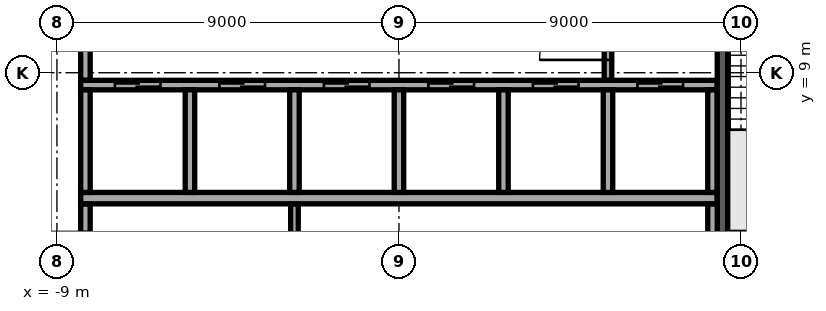
"""IFC4 building model, lengths in metres.
Left out: names, types, materials, properties, quantities, classifications, styles, units other than length and angle.
Written with IfcOpenShell. Run it as: python <this file> out.ifc"""

import sys

from ifc_helpers import new_model, si_unit, direction, frame, frame_2d, origin, place, context, subcontext, project, spatial, rectangle, extrude, element, fill, save


model = new_model("IFC4")
c1 = context("Model", 3, precision=1e-05, world=origin(), true_north=direction((0.0, 1.0)))
c2 = subcontext(c1, "Body", "Model", "MODEL_VIEW")
j1 = project(units=[si_unit("LENGTHUNIT", "METRE"), si_unit("PLANEANGLEUNIT", "RADIAN")], contexts=[c1])
p1 = place(None, origin())
s1 = spatial("IfcSite", under=j1, at=p1, CompositionType="ELEMENT")
p2 = place(p1, origin())
s2 = spatial("IfcBuilding", under=s1, at=p2, CompositionType="ELEMENT")
p3 = place(p2, frame((0.0, 0.0, 262.9)))
s3 = spatial("IfcBuildingStorey", under=s2, at=p3, CompositionType="ELEMENT", Elevation=262.9)
p4 = place(p3, frame((-8.375, 5.7, 0.0), z_axis=(0.0, 0.0, 1.0), x_axis=(1.0, 0.0, 0.0)))
e1 = element("IfcWall", 1, at=p4, inside=s3, PredefinedType="SOLIDWALL", context=c2, shape_type="SweptSolid", body=[
    extrude(rectangle(XDim=16.75, YDim=0.3, at=frame_2d((8.375, 0.0))), origin(), (0.0, 0.0, 1.0), 3.64),
])
p5 = place(p3, frame((-8.375, 8.675, 0.0), z_axis=(0.0, 0.0, 1.0), x_axis=(1.0, 0.0, 0.0)))
e2 = element("IfcWall", 2, at=p5, inside=s3, PredefinedType="SOLIDWALL", context=c2, shape_type="SweptSolid", body=[
    extrude(rectangle(XDim=16.75, YDim=0.25, at=frame_2d((8.375, 0.0))), origin(), (0.0, 0.0, 1.0), 3.64),
])
p6 = place(p5, frame((0.9, 0.0, 0.0)))
e3 = element("IfcOpeningElement", 3, at=p6, cuts=e2, PredefinedType="OPENING", context=c2, shape_type="SweptSolid", body=[
    extrude(rectangle(XDim=1.2, YDim=2.1, at=frame_2d((0.6, 1.05))), frame((0.0, 0.135, 0.0), z_axis=(0.0, -1.0, 0.0), x_axis=(1.0, 0.0, 0.0)), (0.0, 0.0, 1.0), 0.27),
])
p7 = place(p5, frame((3.65, 0.0, 0.0)))
e4 = element("IfcOpeningElement", 4, at=p7, cuts=e2, PredefinedType="OPENING", context=c2, shape_type="SweptSolid", body=[
    extrude(rectangle(XDim=1.2, YDim=2.1, at=frame_2d((0.6, 1.05))), frame((0.0, 0.135, 0.0), z_axis=(0.0, -1.0, 0.0), x_axis=(1.0, 0.0, 0.0)), (0.0, 0.0, 1.0), 0.27),
])
p8 = place(p5, frame((6.4, 0.0, 0.0)))
e5 = element("IfcOpeningElement", 5, at=p8, cuts=e2, PredefinedType="OPENING", context=c2, shape_type="SweptSolid", body=[
    extrude(rectangle(XDim=1.2, YDim=2.1, at=frame_2d((0.6, 1.05))), frame((0.0, 0.135, 0.0), z_axis=(0.0, -1.0, 0.0), x_axis=(1.0, 0.0, 0.0)), (0.0, 0.0, 1.0), 0.27),
])
p9 = place(p5, frame((9.15, 0.0, 0.0)))
e6 = element("IfcOpeningElement", 6, at=p9, cuts=e2, PredefinedType="OPENING", context=c2, shape_type="SweptSolid", body=[
    extrude(rectangle(XDim=1.2, YDim=2.1, at=frame_2d((0.6, 1.05))), frame((0.0, 0.135, 0.0), z_axis=(0.0, -1.0, 0.0), x_axis=(1.0, 0.0, 0.0)), (0.0, 0.0, 1.0), 0.27),
])
p10 = place(p5, frame((11.9, 0.0, 0.0)))
e7 = element("IfcOpeningElement", 7, at=p10, cuts=e2, PredefinedType="OPENING", context=c2, shape_type="SweptSolid", body=[
    extrude(rectangle(XDim=1.2, YDim=2.1, at=frame_2d((0.6, 1.05))), frame((0.0, 0.135, 0.0), z_axis=(0.0, -1.0, 0.0), x_axis=(1.0, 0.0, 0.0)), (0.0, 0.0, 1.0), 0.27),
])
p11 = place(p5, frame((14.65, 0.0, 0.0)))
e8 = element("IfcOpeningElement", 8, at=p11, cuts=e2, PredefinedType="OPENING", context=c2, shape_type="SweptSolid", body=[
    extrude(rectangle(XDim=1.2, YDim=2.1, at=frame_2d((0.6, 1.05))), frame((0.0, 0.135, 0.0), z_axis=(0.0, -1.0, 0.0), x_axis=(1.0, 0.0, 0.0)), (0.0, 0.0, 1.0), 0.27),
])
for number, where, z_axis, x_axis in (
    (9, (-8.25, 5.85, 0.0), (0.0, 0.0, 1.0), (0.0, 1.0, 0.0)),
    (10, (-5.5, 5.85, 0.0), (0.0, 0.0, 1.0), (0.0, 1.0, 0.0)),
    (11, (-2.75, 5.85, 0.0), (0.0, 0.0, 1.0), (0.0, 1.0, 0.0)),
    (12, (0.0, 5.85, 0.0), (0.0, 0.0, 1.0), (0.0, 1.0, 0.0)),
    (13, (2.75, 5.85, 0.0), (0.0, 0.0, 1.0), (0.0, 1.0, 0.0)),
    (14, (5.5, 5.85, 0.0), (0.0, 0.0, 1.0), (0.0, 1.0, 0.0)),
    (15, (8.25, 5.85, 0.0), (0.0, 0.0, 1.0), (0.0, 1.0, 0.0)),
):
    element("IfcWall", number, at=place(p3, frame(where, z_axis=z_axis, x_axis=x_axis)), inside=s3, PredefinedType="SOLIDWALL", context=c2, shape_type="SweptSolid", body=[
        extrude(rectangle(XDim=2.7, YDim=0.25, at=frame_2d((1.35, 0.0))), origin(), (0.0, 0.0, 1.0), 3.64),
    ])
p12 = place(p3, frame((8.512, 4.55, 0.0), z_axis=(0.0, 0.0, 1.0), x_axis=(0.0, 1.0, 0.0)))
e16 = element("IfcWall", 16, at=p12, inside=s3, PredefinedType="SOLIDWALL", context=c2, shape_type="SweptSolid", body=[
    extrude(rectangle(XDim=7.25, YDim=0.275, at=frame_2d((3.625, 0.0))), origin(), (0.0, 0.0, 1.0), 3.64),
])
p13 = place(p12, frame((6.0, 0.0, 0.0)))
e17 = element("IfcOpeningElement", 17, at=p13, cuts=e16, PredefinedType="OPENING", context=c2, shape_type="SweptSolid", body=[
    extrude(rectangle(XDim=1.0, YDim=2.1, at=frame_2d((0.5, 1.05))), frame((0.0, 0.147, 0.0), z_axis=(0.0, -1.0, 0.0), x_axis=(1.0, 0.0, 0.0)), (0.0, 0.0, 1.0), 0.295),
])
p14 = place(p3, frame((-2.75, 2.855, 0.0), z_axis=(0.0, 0.0, 1.0), x_axis=(0.0, 1.0, 0.0)))
e18 = element("IfcWall", 18, at=p14, inside=s3, PredefinedType="PARTITIONING", context=c2, shape_type="SweptSolid", body=[
    extrude(rectangle(XDim=2.69, YDim=0.2, at=frame_2d((1.345, 0.0))), origin(), (0.0, 0.0, 1.0), 3.64),
])
p15 = place(p3, frame((8.25, 2.855, 0.0), z_axis=(0.0, 0.0, 1.0), x_axis=(0.0, 1.0, 0.0)))
e19 = element("IfcWall", 19, at=p15, inside=s3, PredefinedType="PARTITIONING", context=c2, shape_type="SweptSolid", body=[
    extrude(rectangle(XDim=2.69, YDim=0.25, at=frame_2d((1.345, 0.0))), origin(), (0.0, 0.0, 1.0), 3.64),
])
p16 = place(p3, frame((-8.25, 4.78, 0.0), z_axis=(0.0, 0.0, 1.0), x_axis=(0.0, 1.0, 0.0)))
e20 = element("IfcWall", 20, at=p16, inside=s3, PredefinedType="PARTITIONING", context=c2, shape_type="SweptSolid", body=[
    extrude(rectangle(XDim=0.765, YDim=0.25, at=frame_2d((0.382, 0.0))), origin(), (0.0, 0.0, 1.0), 3.64),
])
p17 = place(p3, frame((-8.25, 8.805, 0.0), z_axis=(0.0, 0.0, 1.0), x_axis=(0.0, 1.0, 0.0)))
e21 = element("IfcWall", 21, at=p17, inside=s3, PredefinedType="PARTITIONING", context=c2, shape_type="SweptSolid", body=[
    extrude(rectangle(XDim=2.99, YDim=0.25, at=frame_2d((1.495, 0.0))), origin(), (0.0, 0.0, 1.0), 3.64),
])
p18 = place(p17, frame((0.895, 0.0, 0.0)))
e22 = element("IfcOpeningElement", 22, at=p18, cuts=e21, PredefinedType="OPENING", context=c2, shape_type="SweptSolid", body=[
    extrude(rectangle(XDim=1.0, YDim=2.1, at=frame_2d((0.5, 1.05))), frame((0.0, 0.135, 0.0), z_axis=(0.0, -1.0, 0.0), x_axis=(1.0, 0.0, 0.0)), (0.0, 0.0, 1.0), 0.27),
])
p19 = place(p3, frame((5.5, 8.805, 0.0), z_axis=(0.0, 0.0, 1.0), x_axis=(0.0, 1.0, 0.0)))
e23 = element("IfcWall", 23, at=p19, inside=s3, PredefinedType="PARTITIONING", context=c2, shape_type="SweptSolid", body=[
    extrude(rectangle(XDim=2.99, YDim=0.2, at=frame_2d((1.495, 0.0))), origin(), (0.0, 0.0, 1.0), 3.64),
])
p20 = place(p19, frame((0.532, 0.0, 0.0)))
e24 = element("IfcOpeningElement", 24, at=p20, cuts=e23, PredefinedType="OPENING", context=c2, shape_type="SweptSolid", body=[
    extrude(rectangle(XDim=1.8, YDim=2.1, at=frame_2d((0.9, 1.05))), frame((0.0, 0.11, 0.0), z_axis=(0.0, -1.0, 0.0), x_axis=(1.0, 0.0, 0.0)), (0.0, 0.0, 1.0), 0.22),
])
p21 = place(p3, frame((-8.015, 32.917, 0.0), z_axis=(0.0, 0.0, 1.0), x_axis=(-0.500001675963, -0.866024436165, 0.0)))
e25 = element("IfcWall", 25, at=p21, inside=s3, PredefinedType="STANDARD", context=c2, shape_type="SweptSolid", body=[
    extrude(rectangle(XDim=48.843, YDim=0.6, at=frame_2d((24.421, 0.0))), origin(), (0.0, 0.0, 1.0), 3.64),
])
p22 = place(p21, frame((1.22, 0.0, 0.9)))
e26 = element("IfcOpeningElement", 26, at=p22, cuts=e25, PredefinedType="OPENING", context=c2, shape_type="SweptSolid", body=[
    extrude(rectangle(XDim=2.0, YDim=2.1, at=frame_2d((1.0, 1.05))), frame((0.0, 0.31, 0.0), z_axis=(0.0, -1.0, 0.0), x_axis=(1.0, 0.0, 0.0)), (0.0, 0.0, 1.0), 0.62),
])
p23 = place(p21, frame((5.66, 0.0, 0.9)))
e27 = element("IfcOpeningElement", 27, at=p23, cuts=e25, PredefinedType="OPENING", context=c2, shape_type="SweptSolid", body=[
    extrude(rectangle(XDim=2.0, YDim=2.1, at=frame_2d((1.0, 1.05))), frame((0.0, 0.31, 0.0), z_axis=(0.0, -1.0, 0.0), x_axis=(1.0, 0.0, 0.0)), (0.0, 0.0, 1.0), 0.62),
])
p24 = place(p21, frame((10.101, 0.0, 0.9)))
e28 = element("IfcOpeningElement", 28, at=p24, cuts=e25, PredefinedType="OPENING", context=c2, shape_type="SweptSolid", body=[
    extrude(rectangle(XDim=2.0, YDim=2.1, at=frame_2d((1.0, 1.05))), frame((0.0, 0.31, 0.0), z_axis=(0.0, -1.0, 0.0), x_axis=(1.0, 0.0, 0.0)), (0.0, 0.0, 1.0), 0.62),
])
p25 = place(p21, frame((14.541, 0.0, 0.9)))
e29 = element("IfcOpeningElement", 29, at=p25, cuts=e25, PredefinedType="OPENING", context=c2, shape_type="SweptSolid", body=[
    extrude(rectangle(XDim=2.0, YDim=2.1, at=frame_2d((1.0, 1.05))), frame((0.0, 0.31, 0.0), z_axis=(0.0, -1.0, 0.0), x_axis=(1.0, 0.0, 0.0)), (0.0, 0.0, 1.0), 0.62),
])
p26 = place(p21, frame((18.981, 0.0, 0.9)))
e30 = element("IfcOpeningElement", 30, at=p26, cuts=e25, PredefinedType="OPENING", context=c2, shape_type="SweptSolid", body=[
    extrude(rectangle(XDim=2.0, YDim=2.1, at=frame_2d((1.0, 1.05))), frame((0.0, 0.31, 0.0), z_axis=(0.0, -1.0, 0.0), x_axis=(1.0, 0.0, 0.0)), (0.0, 0.0, 1.0), 0.62),
])
p27 = place(p21, frame((23.422, 0.0, 0.9)))
e31 = element("IfcOpeningElement", 31, at=p27, cuts=e25, PredefinedType="OPENING", context=c2, shape_type="SweptSolid", body=[
    extrude(rectangle(XDim=2.0, YDim=2.1, at=frame_2d((1.0, 1.05))), frame((0.0, 0.31, 0.0), z_axis=(0.0, -1.0, 0.0), x_axis=(1.0, 0.0, 0.0)), (0.0, 0.0, 1.0), 0.62),
])
p28 = place(p21, frame((27.862, 0.0, 0.9)))
e32 = element("IfcOpeningElement", 32, at=p28, cuts=e25, PredefinedType="OPENING", context=c2, shape_type="SweptSolid", body=[
    extrude(rectangle(XDim=2.0, YDim=2.1, at=frame_2d((1.0, 1.05))), frame((0.0, 0.31, 0.0), z_axis=(0.0, -1.0, 0.0), x_axis=(1.0, 0.0, 0.0)), (0.0, 0.0, 1.0), 0.62),
])
p29 = place(p21, frame((32.302, 0.0, 0.9)))
e33 = element("IfcOpeningElement", 33, at=p29, cuts=e25, PredefinedType="OPENING", context=c2, shape_type="SweptSolid", body=[
    extrude(rectangle(XDim=2.0, YDim=2.1, at=frame_2d((1.0, 1.05))), frame((0.0, 0.31, 0.0), z_axis=(0.0, -1.0, 0.0), x_axis=(1.0, 0.0, 0.0)), (0.0, 0.0, 1.0), 0.62),
])
p30 = place(p21, frame((36.742, 0.0, 0.9)))
e34 = element("IfcOpeningElement", 34, at=p30, cuts=e25, PredefinedType="OPENING", context=c2, shape_type="SweptSolid", body=[
    extrude(rectangle(XDim=2.0, YDim=2.1, at=frame_2d((1.0, 1.05))), frame((0.0, 0.31, 0.0), z_axis=(0.0, -1.0, 0.0), x_axis=(1.0, 0.0, 0.0)), (0.0, 0.0, 1.0), 0.62),
])
p31 = place(p21, frame((41.183, 0.0, 0.9)))
e35 = element("IfcOpeningElement", 35, at=p31, cuts=e25, PredefinedType="OPENING", context=c2, shape_type="SweptSolid", body=[
    extrude(rectangle(XDim=2.0, YDim=2.1, at=frame_2d((1.0, 1.05))), frame((0.0, 0.31, 0.0), z_axis=(0.0, -1.0, 0.0), x_axis=(1.0, 0.0, 0.0)), (0.0, 0.0, 1.0), 0.62),
])
p32 = place(p21, frame((45.623, 0.0, 0.9)))
e36 = element("IfcOpeningElement", 36, at=p32, cuts=e25, PredefinedType="OPENING", context=c2, shape_type="SweptSolid", body=[
    extrude(rectangle(XDim=2.0, YDim=2.1, at=frame_2d((1.0, 1.05))), frame((0.0, 0.31, 0.0), z_axis=(0.0, -1.0, 0.0), x_axis=(1.0, 0.0, 0.0)), (0.0, 0.0, 1.0), 0.62),
])
p33 = place(p3, frame((8.094, -32.782, 0.0), z_axis=(0.0, 0.0, 1.0), x_axis=(0.499997945818, 0.866026589763, 0.0)))
e37 = element("IfcWall", 37, at=p33, inside=s3, PredefinedType="STANDARD", context=c2, shape_type="SweptSolid", body=[
    extrude(rectangle(XDim=48.686, YDim=0.6, at=frame_2d((24.343, 0.0))), origin(), (0.0, 0.0, 1.0), 3.64),
])
p34 = place(p33, frame((1.213, 0.0, 0.9)))
e38 = element("IfcOpeningElement", 38, at=p34, cuts=e37, PredefinedType="OPENING", context=c2, shape_type="SweptSolid", body=[
    extrude(rectangle(XDim=2.0, YDim=2.1, at=frame_2d((1.0, 1.05))), frame((0.0, 0.31, 0.0), z_axis=(0.0, -1.0, 0.0), x_axis=(1.0, 0.0, 0.0)), (0.0, 0.0, 1.0), 0.62),
])
p35 = place(p33, frame((5.639, 0.0, 0.9)))
e39 = element("IfcOpeningElement", 39, at=p35, cuts=e37, PredefinedType="OPENING", context=c2, shape_type="SweptSolid", body=[
    extrude(rectangle(XDim=2.0, YDim=2.1, at=frame_2d((1.0, 1.05))), frame((0.0, 0.31, 0.0), z_axis=(0.0, -1.0, 0.0), x_axis=(1.0, 0.0, 0.0)), (0.0, 0.0, 1.0), 0.62),
])
p36 = place(p33, frame((10.065, 0.0, 0.9)))
e40 = element("IfcOpeningElement", 40, at=p36, cuts=e37, PredefinedType="OPENING", context=c2, shape_type="SweptSolid", body=[
    extrude(rectangle(XDim=2.0, YDim=2.1, at=frame_2d((1.0, 1.05))), frame((0.0, 0.31, 0.0), z_axis=(0.0, -1.0, 0.0), x_axis=(1.0, 0.0, 0.0)), (0.0, 0.0, 1.0), 0.62),
])
p37 = place(p33, frame((14.491, 0.0, 0.9)))
e41 = element("IfcOpeningElement", 41, at=p37, cuts=e37, PredefinedType="OPENING", context=c2, shape_type="SweptSolid", body=[
    extrude(rectangle(XDim=2.0, YDim=2.1, at=frame_2d((1.0, 1.05))), frame((0.0, 0.31, 0.0), z_axis=(0.0, -1.0, 0.0), x_axis=(1.0, 0.0, 0.0)), (0.0, 0.0, 1.0), 0.62),
])
p38 = place(p33, frame((18.917, 0.0, 0.9)))
e42 = element("IfcOpeningElement", 42, at=p38, cuts=e37, PredefinedType="OPENING", context=c2, shape_type="SweptSolid", body=[
    extrude(rectangle(XDim=2.0, YDim=2.1, at=frame_2d((1.0, 1.05))), frame((0.0, 0.31, 0.0), z_axis=(0.0, -1.0, 0.0), x_axis=(1.0, 0.0, 0.0)), (0.0, 0.0, 1.0), 0.62),
])
p39 = place(p33, frame((23.343, 0.0, 0.9)))
e43 = element("IfcOpeningElement", 43, at=p39, cuts=e37, PredefinedType="OPENING", context=c2, shape_type="SweptSolid", body=[
    extrude(rectangle(XDim=2.0, YDim=2.1, at=frame_2d((1.0, 1.05))), frame((0.0, 0.31, 0.0), z_axis=(0.0, -1.0, 0.0), x_axis=(1.0, 0.0, 0.0)), (0.0, 0.0, 1.0), 0.62),
])
p40 = place(p33, frame((27.769, 0.0, 0.9)))
e44 = element("IfcOpeningElement", 44, at=p40, cuts=e37, PredefinedType="OPENING", context=c2, shape_type="SweptSolid", body=[
    extrude(rectangle(XDim=2.0, YDim=2.1, at=frame_2d((1.0, 1.05))), frame((0.0, 0.31, 0.0), z_axis=(0.0, -1.0, 0.0), x_axis=(1.0, 0.0, 0.0)), (0.0, 0.0, 1.0), 0.62),
])
p41 = place(p33, frame((32.195, 0.0, 0.9)))
e45 = element("IfcOpeningElement", 45, at=p41, cuts=e37, PredefinedType="OPENING", context=c2, shape_type="SweptSolid", body=[
    extrude(rectangle(XDim=2.0, YDim=2.1, at=frame_2d((1.0, 1.05))), frame((0.0, 0.31, 0.0), z_axis=(0.0, -1.0, 0.0), x_axis=(1.0, 0.0, 0.0)), (0.0, 0.0, 1.0), 0.62),
])
p42 = place(p33, frame((36.621, 0.0, 0.9)))
e46 = element("IfcOpeningElement", 46, at=p42, cuts=e37, PredefinedType="OPENING", context=c2, shape_type="SweptSolid", body=[
    extrude(rectangle(XDim=2.0, YDim=2.1, at=frame_2d((1.0, 1.05))), frame((0.0, 0.31, 0.0), z_axis=(0.0, -1.0, 0.0), x_axis=(1.0, 0.0, 0.0)), (0.0, 0.0, 1.0), 0.62),
])
p43 = place(p33, frame((41.047, 0.0, 0.9)))
e47 = element("IfcOpeningElement", 47, at=p43, cuts=e37, PredefinedType="OPENING", context=c2, shape_type="SweptSolid", body=[
    extrude(rectangle(XDim=2.0, YDim=2.1, at=frame_2d((1.0, 1.05))), frame((0.0, 0.31, 0.0), z_axis=(0.0, -1.0, 0.0), x_axis=(1.0, 0.0, 0.0)), (0.0, 0.0, 1.0), 0.62),
])
p44 = place(p33, frame((45.473, 0.0, 0.9)))
e48 = element("IfcOpeningElement", 48, at=p44, cuts=e37, PredefinedType="OPENING", context=c2, shape_type="SweptSolid", body=[
    extrude(rectangle(XDim=2.0, YDim=2.1, at=frame_2d((1.0, 1.05))), frame((0.0, 0.31, 0.0), z_axis=(0.0, -1.0, 0.0), x_axis=(1.0, 0.0, 0.0)), (0.0, 0.0, 1.0), 0.62),
])
p45 = place(p3, frame((-7.247, 26.698, 0.0), z_axis=(0.0, 0.0, 1.0), x_axis=(0.866022442497, -0.500005129065, 0.0)))
e49 = element("IfcWall", 49, at=p45, inside=s3, PredefinedType="PARTITIONING", context=c2, shape_type="SweptSolid", body=[
    extrude(rectangle(XDim=39.325, YDim=0.15, at=frame_2d((19.662, 0.0))), origin(), (0.0, 0.0, 1.0), 3.04),
])
p46 = place(p45, frame((15.654, 0.0, 0.0)))
e50 = element("IfcOpeningElement", 50, at=p46, cuts=e49, PredefinedType="OPENING", context=c2, shape_type="SweptSolid", body=[
    extrude(rectangle(XDim=1.0, YDim=2.1, at=frame_2d((0.5, 1.05))), frame((0.0, 0.085, 0.0), z_axis=(0.0, -1.0, 0.0), x_axis=(1.0, 0.0, 0.0)), (0.0, 0.0, 1.0), 0.17),
])
p47 = place(p45, frame((23.442, 0.0, 0.0)))
e51 = element("IfcOpeningElement", 51, at=p47, cuts=e49, PredefinedType="OPENING", context=c2, shape_type="SweptSolid", body=[
    extrude(rectangle(XDim=1.0, YDim=2.1, at=frame_2d((0.5, 1.05))), frame((0.0, 0.085, 0.0), z_axis=(0.0, -1.0, 0.0), x_axis=(1.0, 0.0, 0.0)), (0.0, 0.0, 1.0), 0.17),
])
p48 = place(p45, frame((31.841, 0.0, 0.0)))
e52 = element("IfcOpeningElement", 52, at=p48, cuts=e49, PredefinedType="OPENING", context=c2, shape_type="SweptSolid", body=[
    extrude(rectangle(XDim=1.0, YDim=2.1, at=frame_2d((0.5, 1.05))), frame((0.0, 0.085, 0.0), z_axis=(0.0, -1.0, 0.0), x_axis=(1.0, 0.0, 0.0)), (0.0, 0.0, 1.0), 0.17),
])
p49 = place(p45, frame((36.955, 0.0, 0.0)))
e53 = element("IfcOpeningElement", 53, at=p49, cuts=e49, PredefinedType="OPENING", context=c2, shape_type="SweptSolid", body=[
    extrude(rectangle(XDim=1.0, YDim=2.1, at=frame_2d((0.5, 1.05))), frame((0.0, 0.085, 0.0), z_axis=(0.0, -1.0, 0.0), x_axis=(1.0, 0.0, 0.0)), (0.0, 0.0, 1.0), 0.17),
])
p50 = place(p6, origin())
e54 = element("IfcDoor", 54, at=p50, inside=s3, OperationType="DOUBLE_DOOR_SLIDING", PredefinedType="DOOR", context=c2, shape_type="SweptSolid", body=[
    extrude(rectangle(XDim=1.2, YDim=2.1, at=frame_2d((0.6, 1.05))), frame((0.0, 0.025, 0.0), z_axis=(0.0, -1.0, 0.0), x_axis=(1.0, 0.0, 0.0)), (0.0, 0.0, 1.0), 0.05),
])
fill(e3, e54)
p51 = place(p7, origin())
e55 = element("IfcDoor", 55, at=p51, inside=s3, OperationType="DOUBLE_DOOR_SLIDING", PredefinedType="DOOR", context=c2, shape_type="SweptSolid", body=[
    extrude(rectangle(XDim=1.2, YDim=2.1, at=frame_2d((0.6, 1.05))), frame((0.0, 0.025, 0.0), z_axis=(0.0, -1.0, 0.0), x_axis=(1.0, 0.0, 0.0)), (0.0, 0.0, 1.0), 0.05),
])
fill(e4, e55)
p52 = place(p8, origin())
e56 = element("IfcDoor", 56, at=p52, inside=s3, OperationType="DOUBLE_DOOR_SLIDING", PredefinedType="DOOR", context=c2, shape_type="SweptSolid", body=[
    extrude(rectangle(XDim=1.2, YDim=2.1, at=frame_2d((0.6, 1.05))), frame((0.0, 0.025, 0.0), z_axis=(0.0, -1.0, 0.0), x_axis=(1.0, 0.0, 0.0)), (0.0, 0.0, 1.0), 0.05),
])
fill(e5, e56)
p53 = place(p9, origin())
e57 = element("IfcDoor", 57, at=p53, inside=s3, OperationType="DOUBLE_DOOR_SLIDING", PredefinedType="DOOR", context=c2, shape_type="SweptSolid", body=[
    extrude(rectangle(XDim=1.2, YDim=2.1, at=frame_2d((0.6, 1.05))), frame((0.0, 0.025, 0.0), z_axis=(0.0, -1.0, 0.0), x_axis=(1.0, 0.0, 0.0)), (0.0, 0.0, 1.0), 0.05),
])
fill(e6, e57)
p54 = place(p10, origin())
e58 = element("IfcDoor", 58, at=p54, inside=s3, OperationType="DOUBLE_DOOR_SLIDING", PredefinedType="DOOR", context=c2, shape_type="SweptSolid", body=[
    extrude(rectangle(XDim=1.2, YDim=2.1, at=frame_2d((0.6, 1.05))), frame((0.0, 0.025, 0.0), z_axis=(0.0, -1.0, 0.0), x_axis=(1.0, 0.0, 0.0)), (0.0, 0.0, 1.0), 0.05),
])
fill(e7, e58)
p55 = place(p11, origin())
e59 = element("IfcDoor", 59, at=p55, inside=s3, OperationType="DOUBLE_DOOR_SLIDING", PredefinedType="DOOR", context=c2, shape_type="SweptSolid", body=[
    extrude(rectangle(XDim=1.2, YDim=2.1, at=frame_2d((0.6, 1.05))), frame((0.0, 0.025, 0.0), z_axis=(0.0, -1.0, 0.0), x_axis=(1.0, 0.0, 0.0)), (0.0, 0.0, 1.0), 0.05),
])
fill(e8, e59)
p56 = place(p20, origin())
e60 = element("IfcDoor", 60, at=p56, inside=s3, OperationType="SINGLE_SWING_LEFT", PredefinedType="DOOR", context=c2, shape_type="SweptSolid", body=[
    extrude(rectangle(XDim=1.8, YDim=2.1, at=frame_2d((0.9, 1.05))), frame((0.0, 0.025, 0.0), z_axis=(0.0, -1.0, 0.0), x_axis=(1.0, 0.0, 0.0)), (0.0, 0.0, 1.0), 0.05),
])
fill(e24, e60)
save(model, sys.argv[1])
